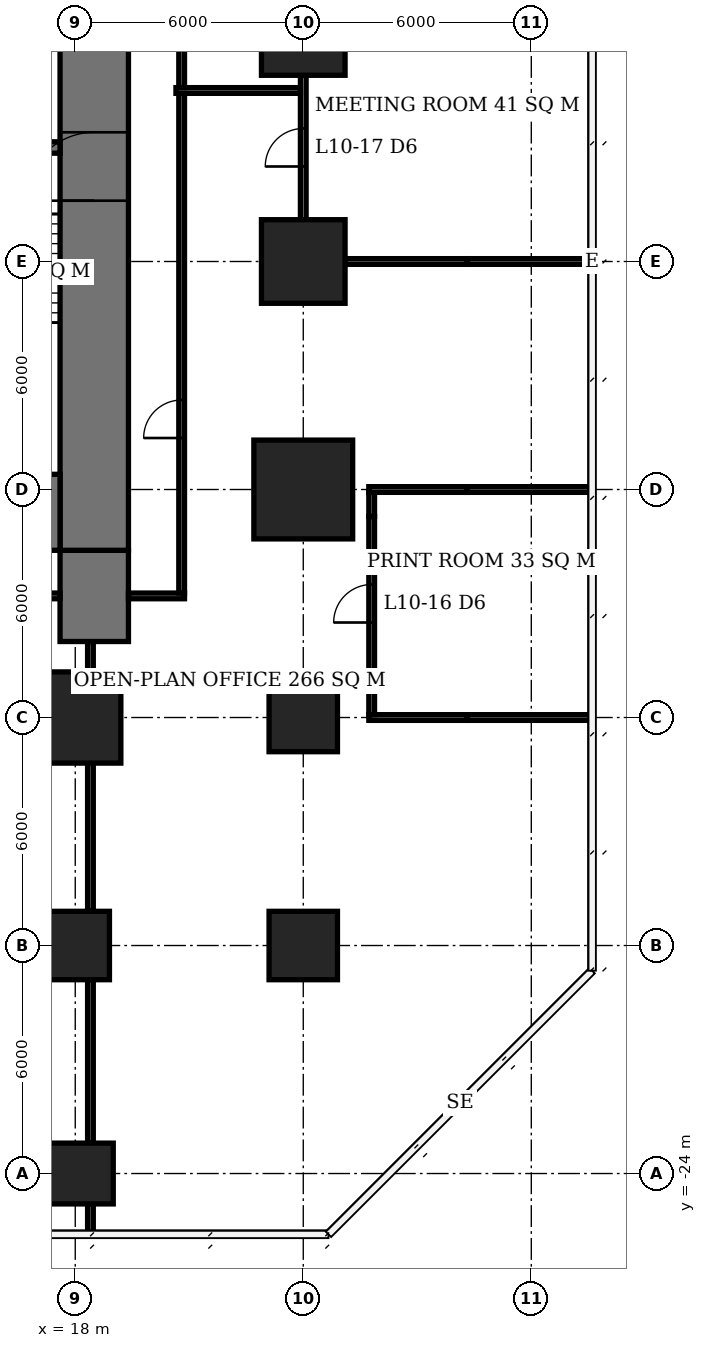
"""IFC4 building model, lengths in metres.
Left out: names, types, materials, properties, quantities, classifications, styles, units other than length and angle.
Written with IfcOpenShell. Run it as: python <this file> out.ifc"""

import sys

from ifc_helpers import new_model, si_unit, direction, frame, frame_2d, origin, origin_2d, place, context, subcontext, project, spatial, rectangle, extrude, element, fill, save


model = new_model("IFC4")
c1 = context("Model", 3, precision=1e-05, world=origin(), true_north=direction((0.0, 1.0)))
c2 = subcontext(c1, "Body", "Model", "MODEL_VIEW")
j1 = project(units=[si_unit("LENGTHUNIT", "METRE"), si_unit("PLANEANGLEUNIT", "RADIAN")], contexts=[c1])
p1 = place(None, origin())
s1 = spatial("IfcSite", under=j1, at=p1, CompositionType="ELEMENT")
p2 = place(p1, origin())
s2 = spatial("IfcBuilding", under=s1, at=p2, CompositionType="ELEMENT")
p3 = place(p2, frame((0.0, 0.0, 45.5)))
s3 = spatial("IfcBuildingStorey", under=s2, at=p3, CompositionType="ELEMENT", Elevation=45.5)
p4 = place(p3, frame((18.0, -24.0, 0.0), z_axis=(0.0, 0.0, 1.0), x_axis=(1.0, 0.0, 0.0)))
e1 = element("IfcColumn", 1, at=p4, inside=s3, PredefinedType="COLUMN", context=c2, shape_type="SweptSolid", body=[
    extrude(rectangle(XDim=2.0, YDim=1.6, at=origin_2d()), origin(), (0.0, 0.0, 1.0), 3.9),
])
p5 = place(p3, frame((18.0, -18.0, 0.0), z_axis=(0.0, 0.0, 1.0), x_axis=(1.0, 0.0, 0.0)))
e2 = element("IfcColumn", 2, at=p5, inside=s3, PredefinedType="COLUMN", context=c2, shape_type="SweptSolid", body=[
    extrude(rectangle(XDim=1.8, YDim=1.8, at=origin_2d()), origin(), (0.0, 0.0, 1.0), 3.9),
])
p6 = place(p3, frame((18.0, -12.0, 0.0), z_axis=(0.0, 0.0, 1.0), x_axis=(1.0, 0.0, 0.0)))
e3 = element("IfcColumn", 3, at=p6, inside=s3, PredefinedType="COLUMN", context=c2, shape_type="SweptSolid", body=[
    extrude(rectangle(XDim=2.4, YDim=2.4, at=origin_2d()), origin(), (0.0, 0.0, 1.0), 3.9),
])
for number, where, z_axis, x_axis in (
    (4, (24.0, -18.0, 0.0), (0.0, 0.0, 1.0), (1.0, 0.0, 0.0)),
    (5, (24.0, -12.0, 0.0), (0.0, 0.0, 1.0), (1.0, 0.0, 0.0)),
):
    element("IfcColumn", number, at=place(p3, frame(where, z_axis=z_axis, x_axis=x_axis)), inside=s3, PredefinedType="COLUMN", context=c2, shape_type="SweptSolid", body=[
        extrude(rectangle(XDim=1.8, YDim=1.8, at=origin_2d()), origin(), (0.0, 0.0, 1.0), 3.9),
    ])
p7 = place(p3, frame((24.0, -6.0, 0.0), z_axis=(0.0, 0.0, 1.0), x_axis=(1.0, 0.0, 0.0)))
e6 = element("IfcColumn", 6, at=p7, inside=s3, PredefinedType="COLUMN", context=c2, shape_type="SweptSolid", body=[
    extrude(rectangle(XDim=2.6, YDim=2.6, at=origin_2d()), origin(), (0.0, 0.0, 1.0), 3.9),
])
for number, where, z_axis, x_axis in (
    (7, (24.0, 0.0, 0.0), (0.0, 0.0, 1.0), (1.0, 0.0, 0.0)),
    (8, (24.0, 6.0, 0.0), (0.0, 0.0, 1.0), (1.0, 0.0, 0.0)),
):
    element("IfcColumn", number, at=place(p3, frame(where, z_axis=z_axis, x_axis=x_axis)), inside=s3, PredefinedType="COLUMN", context=c2, shape_type="SweptSolid", body=[
        extrude(rectangle(XDim=2.2, YDim=2.2, at=origin_2d()), origin(), (0.0, 0.0, 1.0), 3.9),
    ])
p8 = place(p3, frame((-5.6, -6.6, 0.0), z_axis=(0.0, 0.0, 1.0), x_axis=(1.0, 0.0, 0.0)))
e9 = element("IfcWall", 9, at=p8, inside=s3, PredefinedType="SHEAR", context=c2, shape_type="SweptSolid", body=[
    extrude(rectangle(XDim=23.2, YDim=2.0, at=frame_2d((11.6, 0.0))), origin(), (0.0, 0.0, 1.0), 3.9),
])
p9 = place(p3, frame((18.5, -7.6, 0.0), z_axis=(0.0, 0.0, 1.0), x_axis=(0.0, 1.0, 0.0)))
e10 = element("IfcWall", 10, at=p9, inside=s3, PredefinedType="SHEAR", context=c2, shape_type="SweptSolid", body=[
    extrude(rectangle(XDim=21.2, YDim=1.8, at=frame_2d((10.6, 0.0))), origin(), (0.0, 0.0, 1.0), 3.9),
])
p10 = place(p9, frame((9.2, 0.0, 0.0)))
e11 = element("IfcOpeningElement", 11, at=p10, cuts=e10, PredefinedType="OPENING", context=c2, shape_type="SweptSolid", body=[
    extrude(rectangle(XDim=1.8, YDim=2.4, at=frame_2d((0.9, 1.2))), frame((0.0, 0.91, 0.0), z_axis=(0.0, -1.0, 0.0), x_axis=(1.0, 0.0, 0.0)), (0.0, 0.0, 1.0), 1.82),
])
p11 = place(p3, frame((18.5, -10.0, 0.0), z_axis=(0.0, 0.0, 1.0), x_axis=(0.0, 1.0, 0.0)))
e12 = element("IfcWall", 12, at=p11, inside=s3, PredefinedType="SHEAR", context=c2, shape_type="SweptSolid", body=[
    extrude(rectangle(XDim=2.4, YDim=1.8, at=frame_2d((1.2, 0.0))), origin(), (0.0, 0.0, 1.0), 3.9),
])
p12 = place(p3, frame((12.15, 3.0, 0.0), z_axis=(0.0, 0.0, 1.0), x_axis=(1.0, 0.0, 0.0)))
e13 = element("IfcWall", 13, at=p12, inside=s3, PredefinedType="SHEAR", context=c2, shape_type="SweptSolid", body=[
    extrude(rectangle(XDim=5.45, YDim=0.3, at=frame_2d((2.725, 0.0))), origin(), (0.0, 0.0, 1.0), 3.9),
])
p13 = place(p12, frame((3.25, 0.0, 0.0)))
e14 = element("IfcOpeningElement", 14, at=p13, cuts=e13, PredefinedType="OPENING", context=c2, shape_type="SweptSolid", body=[
    extrude(rectangle(XDim=1.2, YDim=2.1, at=frame_2d((0.6, 1.05))), frame((0.0, 0.16, 0.0), z_axis=(0.0, -1.0, 0.0), x_axis=(1.0, 0.0, 0.0)), (0.0, 0.0, 1.0), 0.32),
])
p14 = place(p12, frame((0.45, 0.0, 0.0)))
e15 = element("IfcOpeningElement", 15, at=p14, cuts=e13, PredefinedType="OPENING", context=c2, shape_type="SweptSolid", body=[
    extrude(rectangle(XDim=0.9, YDim=2.1, at=frame_2d((0.45, 1.05))), frame((0.0, 0.16, 0.0), z_axis=(0.0, -1.0, 0.0), x_axis=(1.0, 0.0, 0.0)), (0.0, 0.0, 1.0), 0.32),
])
p15 = place(p3, frame((25.725, -12.0, 0.0), z_axis=(0.0, 0.0, 1.0), x_axis=(1.0, 0.0, 0.0)))
e16 = element("IfcWall", 16, at=p15, inside=s3, PredefinedType="PARTITIONING", context=c2, shape_type="SweptSolid", body=[
    extrude(rectangle(XDim=2.585, YDim=0.15, at=frame_2d((1.292, 0.0))), origin(), (0.0, 0.0, 1.0), 2.65),
])
p16 = place(p3, frame((28.31, -12.0, 0.0), z_axis=(0.0, 0.0, 1.0), x_axis=(1.0, 0.0, 0.0)))
e17 = element("IfcWall", 17, at=p16, inside=s3, PredefinedType="PARTITIONING", context=c2, shape_type="SweptSolid", body=[
    extrude(rectangle(XDim=3.29, YDim=0.15, at=frame_2d((1.645, 0.0))), origin(), (0.0, 0.0, 1.0), 3.65),
])
p17 = place(p3, frame((25.725, -6.0, 0.0), z_axis=(0.0, 0.0, 1.0), x_axis=(1.0, 0.0, 0.0)))
e18 = element("IfcWall", 18, at=p17, inside=s3, PredefinedType="PARTITIONING", context=c2, shape_type="SweptSolid", body=[
    extrude(rectangle(XDim=2.585, YDim=0.15, at=frame_2d((1.292, 0.0))), origin(), (0.0, 0.0, 1.0), 2.65),
])
p18 = place(p3, frame((28.31, -6.0, 0.0), z_axis=(0.0, 0.0, 1.0), x_axis=(1.0, 0.0, 0.0)))
e19 = element("IfcWall", 19, at=p18, inside=s3, PredefinedType="PARTITIONING", context=c2, shape_type="SweptSolid", body=[
    extrude(rectangle(XDim=3.29, YDim=0.15, at=frame_2d((1.645, 0.0))), origin(), (0.0, 0.0, 1.0), 3.65),
])
p19 = place(p3, frame((25.1, 0.0, 0.0), z_axis=(0.0, 0.0, 1.0), x_axis=(1.0, 0.0, 0.0)))
e20 = element("IfcWall", 20, at=p19, inside=s3, PredefinedType="PARTITIONING", context=c2, shape_type="SweptSolid", body=[
    extrude(rectangle(XDim=3.21, YDim=0.15, at=frame_2d((1.605, 0.0))), origin(), (0.0, 0.0, 1.0), 2.65),
])
p20 = place(p3, frame((28.31, 0.0, 0.0), z_axis=(0.0, 0.0, 1.0), x_axis=(1.0, 0.0, 0.0)))
e21 = element("IfcWall", 21, at=p20, inside=s3, PredefinedType="PARTITIONING", context=c2, shape_type="SweptSolid", body=[
    extrude(rectangle(XDim=3.24, YDim=0.15, at=frame_2d((1.62, 0.0))), origin(), (0.0, 0.0, 1.0), 3.65),
])
p21 = place(p3, frame((24.0, 1.1, 0.0), z_axis=(0.0, 0.0, 1.0), x_axis=(0.0, 1.0, 0.0)))
e22 = element("IfcWall", 22, at=p21, inside=s3, PredefinedType="PARTITIONING", context=c2, shape_type="SweptSolid", body=[
    extrude(rectangle(XDim=3.8, YDim=0.15, at=frame_2d((1.9, 0.0))), origin(), (0.0, 0.0, 1.0), 3.65),
])
p22 = place(p21, frame((1.4, 0.0, 0.0)))
e23 = element("IfcOpeningElement", 23, at=p22, cuts=e22, PredefinedType="OPENING", context=c2, shape_type="SweptSolid", body=[
    extrude(rectangle(XDim=1.0, YDim=2.1, at=frame_2d((0.5, 1.05))), frame((0.0, 0.085, 0.0), z_axis=(0.0, -1.0, 0.0), x_axis=(1.0, 0.0, 0.0)), (0.0, 0.0, 1.0), 0.17),
])
p23 = place(p3, frame((25.8, -11.925, 0.0), z_axis=(0.0, 0.0, 1.0), x_axis=(0.0, 1.0, 0.0)))
e24 = element("IfcWall", 24, at=p23, inside=s3, PredefinedType="PARTITIONING", context=c2, shape_type="SweptSolid", body=[
    extrude(rectangle(XDim=0.635, YDim=0.15, at=frame_2d((0.317, 0.0))), origin(), (0.0, 0.0, 1.0), 2.65),
])
p24 = place(p3, frame((25.8, -11.29, 0.0), z_axis=(0.0, 0.0, 1.0), x_axis=(0.0, 1.0, 0.0)))
e25 = element("IfcWall", 25, at=p24, inside=s3, PredefinedType="PARTITIONING", context=c2, shape_type="SweptSolid", body=[
    extrude(rectangle(XDim=4.58, YDim=0.15, at=frame_2d((2.29, 0.0))), origin(), (0.0, 0.0, 1.0), 3.65),
])
p25 = place(p24, frame((1.79, 0.0, 0.0)))
e26 = element("IfcOpeningElement", 26, at=p25, cuts=e25, PredefinedType="OPENING", context=c2, shape_type="SweptSolid", body=[
    extrude(rectangle(XDim=1.0, YDim=2.1, at=frame_2d((0.5, 1.05))), frame((0.0, 0.085, 0.0), z_axis=(0.0, -1.0, 0.0), x_axis=(1.0, 0.0, 0.0)), (0.0, 0.0, 1.0), 0.17),
])
p26 = place(p3, frame((25.8, -6.71, 0.0), z_axis=(0.0, 0.0, 1.0), x_axis=(0.0, 1.0, 0.0)))
e27 = element("IfcWall", 27, at=p26, inside=s3, PredefinedType="PARTITIONING", context=c2, shape_type="SweptSolid", body=[
    extrude(rectangle(XDim=0.635, YDim=0.15, at=frame_2d((0.317, 0.0))), origin(), (0.0, 0.0, 1.0), 2.65),
])
p27 = place(p3, frame((4.575, -8.8, 0.0), z_axis=(0.0, 0.0, 1.0), x_axis=(1.0, 0.0, 0.0)))
e28 = element("IfcWall", 28, at=p27, inside=s3, PredefinedType="PARTITIONING", context=c2, shape_type="SweptSolid", body=[
    extrude(rectangle(XDim=13.025, YDim=0.15, at=frame_2d((6.513, 0.0))), origin(), (0.0, 0.0, 1.0), 3.65),
])
p28 = place(p27, frame((4.01, 0.0, 0.0)))
e29 = element("IfcOpeningElement", 29, at=p28, cuts=e28, PredefinedType="OPENING", context=c2, shape_type="SweptSolid", body=[
    extrude(rectangle(XDim=1.0, YDim=2.1, at=frame_2d((0.5, 1.05))), frame((0.0, 0.085, 0.0), z_axis=(0.0, -1.0, 0.0), x_axis=(1.0, 0.0, 0.0)), (0.0, 0.0, 1.0), 0.17),
])
p29 = place(p3, frame((18.4, -25.55, 0.0), z_axis=(0.0, 0.0, 1.0), x_axis=(0.0, 1.0, 0.0)))
e30 = element("IfcWall", 30, at=p29, inside=s3, PredefinedType="PARTITIONING", context=c2, shape_type="SweptSolid", body=[
    extrude(rectangle(XDim=0.75, YDim=0.15, at=frame_2d((0.375, 0.0))), origin(), (0.0, 0.0, 1.0), 3.65),
])
p30 = place(p3, frame((18.4, -23.2, 0.0), z_axis=(0.0, 0.0, 1.0), x_axis=(0.0, 1.0, 0.0)))
e31 = element("IfcWall", 31, at=p30, inside=s3, PredefinedType="PARTITIONING", context=c2, shape_type="SweptSolid", body=[
    extrude(rectangle(XDim=4.3, YDim=0.15, at=frame_2d((2.15, 0.0))), origin(), (0.0, 0.0, 1.0), 3.65),
])
p31 = place(p3, frame((18.4, -17.1, 0.0), z_axis=(0.0, 0.0, 1.0), x_axis=(0.0, 1.0, 0.0)))
e32 = element("IfcWall", 32, at=p31, inside=s3, PredefinedType="PARTITIONING", context=c2, shape_type="SweptSolid", body=[
    extrude(rectangle(XDim=3.9, YDim=0.15, at=frame_2d((1.95, 0.0))), origin(), (0.0, 0.0, 1.0), 3.65),
])
p32 = place(p3, frame((18.4, -10.8, 0.0), z_axis=(0.0, 0.0, 1.0), x_axis=(0.0, 1.0, 0.0)))
e33 = element("IfcWall", 33, at=p32, inside=s3, PredefinedType="PARTITIONING", context=c2, shape_type="SweptSolid", body=[
    extrude(rectangle(XDim=0.8, YDim=0.15, at=frame_2d((0.4, 0.0))), origin(), (0.0, 0.0, 1.0), 3.65),
])
p33 = place(p3, frame((19.4, -8.8, 0.0), z_axis=(0.0, 0.0, 1.0), x_axis=(1.0, 0.0, 0.0)))
e34 = element("IfcWall", 34, at=p33, inside=s3, PredefinedType="PARTITIONING", context=c2, shape_type="SweptSolid", body=[
    extrude(rectangle(XDim=1.475, YDim=0.15, at=frame_2d((0.738, 0.0))), origin(), (0.0, 0.0, 1.0), 3.65),
])
p34 = place(p3, frame((20.8, -8.725, 0.0), z_axis=(0.0, 0.0, 1.0), x_axis=(0.0, 1.0, 0.0)))
e35 = element("IfcWall", 35, at=p34, inside=s3, PredefinedType="PARTITIONING", context=c2, shape_type="SweptSolid", body=[
    extrude(rectangle(XDim=13.15, YDim=0.15, at=frame_2d((6.575, 0.0))), origin(), (0.0, 0.0, 1.0), 3.65),
])
p35 = place(p34, frame((4.08, 0.0, 0.0)))
e36 = element("IfcOpeningElement", 36, at=p35, cuts=e35, PredefinedType="OPENING", context=c2, shape_type="SweptSolid", body=[
    extrude(rectangle(XDim=1.0, YDim=2.1, at=frame_2d((0.5, 1.05))), frame((0.0, 0.085, 0.0), z_axis=(0.0, -1.0, 0.0), x_axis=(1.0, 0.0, 0.0)), (0.0, 0.0, 1.0), 0.17),
])
p36 = place(p3, frame((20.8, 4.575, 0.0), z_axis=(0.0, 0.0, 1.0), x_axis=(0.0, 1.0, 0.0)))
e37 = element("IfcWall", 37, at=p36, inside=s3, PredefinedType="PARTITIONING", context=c2, shape_type="SweptSolid", body=[
    extrude(rectangle(XDim=8.85, YDim=0.15, at=frame_2d((4.425, 0.0))), origin(), (0.0, 0.0, 1.0), 3.65),
])
p37 = place(p36, frame((5.275, 0.0, 0.0)))
e38 = element("IfcOpeningElement", 38, at=p37, cuts=e37, PredefinedType="OPENING", context=c2, shape_type="SweptSolid", body=[
    extrude(rectangle(XDim=1.0, YDim=2.1, at=frame_2d((0.5, 1.05))), frame((0.0, 0.085, 0.0), z_axis=(0.0, -1.0, 0.0), x_axis=(1.0, 0.0, 0.0)), (0.0, 0.0, 1.0), 0.17),
])
p38 = place(p3, frame((20.65, 4.5, 0.0), z_axis=(0.0, 0.0, 1.0), x_axis=(1.0, 0.0, 0.0)))
e39 = element("IfcWall", 39, at=p38, inside=s3, PredefinedType="PARTITIONING", context=c2, shape_type="SweptSolid", body=[
    extrude(rectangle(XDim=3.275, YDim=0.15, at=frame_2d((1.638, 0.0))), origin(), (0.0, 0.0, 1.0), 3.65),
])
p39 = place(p10, origin())
e40 = element("IfcDoor", 40, at=p39, inside=s3, OperationType="DOUBLE_DOOR_SINGLE_SWING", PredefinedType="DOOR", context=c2, shape_type="SweptSolid", body=[
    extrude(rectangle(XDim=1.8, YDim=2.4, at=frame_2d((0.9, 1.2))), frame((0.0, 0.025, 0.0), z_axis=(0.0, -1.0, 0.0), x_axis=(1.0, 0.0, 0.0)), (0.0, 0.0, 1.0), 0.05),
])
fill(e11, e40)
p40 = place(p25, origin())
e41 = element("IfcDoor", 41, at=p40, inside=s3, OperationType="SINGLE_SWING_LEFT", PredefinedType="DOOR", context=c2, shape_type="SweptSolid", body=[
    extrude(rectangle(XDim=1.0, YDim=2.1, at=frame_2d((0.5, 1.05))), frame((0.0, 0.025, 0.0), z_axis=(0.0, -1.0, 0.0), x_axis=(1.0, 0.0, 0.0)), (0.0, 0.0, 1.0), 0.05),
])
fill(e26, e41)
p41 = place(p22, origin())
e42 = element("IfcDoor", 42, at=p41, inside=s3, OperationType="SINGLE_SWING_LEFT", PredefinedType="DOOR", context=c2, shape_type="SweptSolid", body=[
    extrude(rectangle(XDim=1.0, YDim=2.1, at=frame_2d((0.5, 1.05))), frame((0.0, 0.025, 0.0), z_axis=(0.0, -1.0, 0.0), x_axis=(1.0, 0.0, 0.0)), (0.0, 0.0, 1.0), 0.05),
])
fill(e23, e42)
p42 = place(p35, origin())
e43 = element("IfcDoor", 43, at=p42, inside=s3, OperationType="SINGLE_SWING_LEFT", PredefinedType="DOOR", context=c2, shape_type="SweptSolid", body=[
    extrude(rectangle(XDim=1.0, YDim=2.1, at=frame_2d((0.5, 1.05))), frame((0.0, 0.025, 0.0), z_axis=(0.0, -1.0, 0.0), x_axis=(1.0, 0.0, 0.0)), (0.0, 0.0, 1.0), 0.05),
])
fill(e36, e43)
save(model, sys.argv[1])
